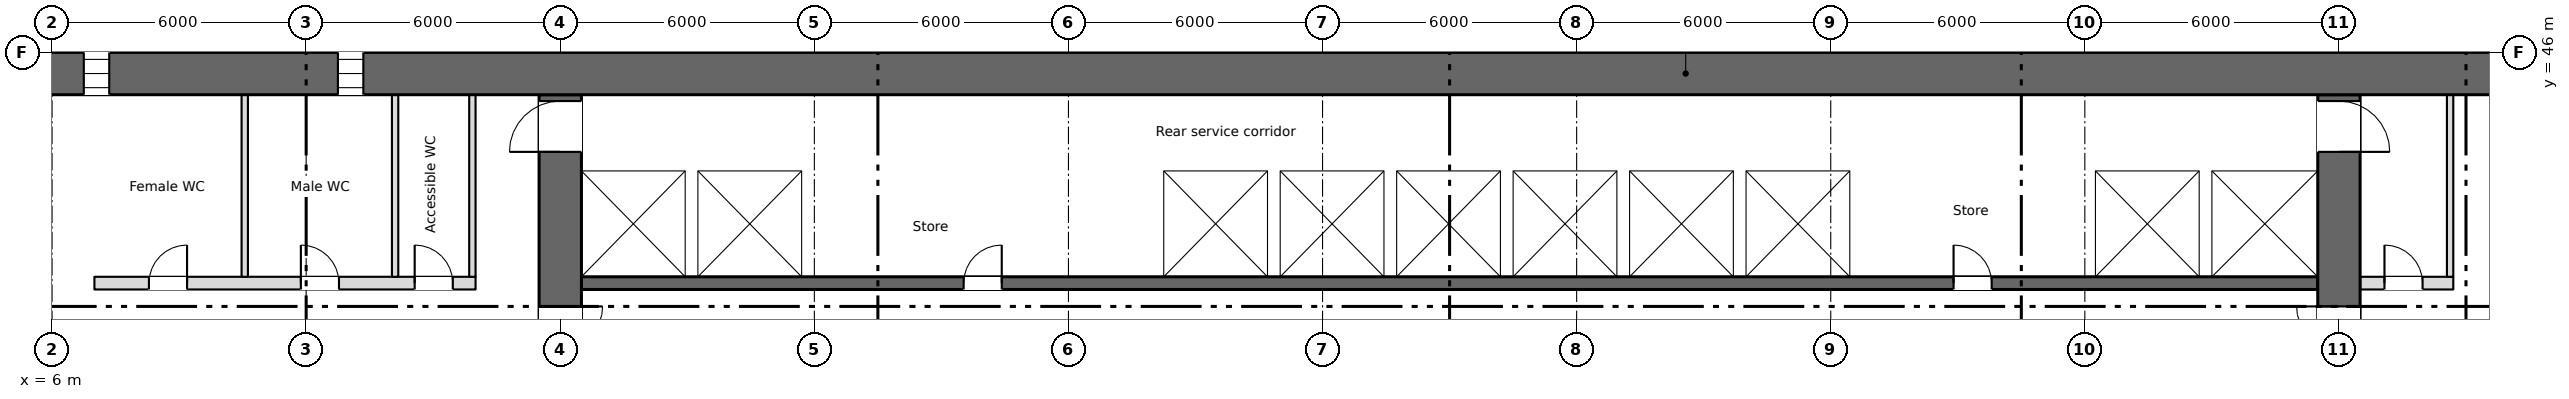
"""IFC4 building model, lengths in metres.
Left out: names, types, materials, properties, quantities, classifications, styles, units other than length and angle.
Written with IfcOpenShell. Run it as: python <this file> out.ifc"""

import sys

from ifc_helpers import new_model, si_unit, direction, frame, frame_2d, origin, place, context, subcontext, project, spatial, rectangle, extrude, element, fill, save


model = new_model("IFC4")
c1 = context("Model", 3, precision=1e-05, world=origin(), true_north=direction((0.0, 1.0)))
c2 = subcontext(c1, "Body", "Model", "MODEL_VIEW")
j1 = project(units=[si_unit("LENGTHUNIT", "METRE"), si_unit("PLANEANGLEUNIT", "RADIAN")], contexts=[c1])
p1 = place(None, origin())
s1 = spatial("IfcSite", under=j1, at=p1, CompositionType="ELEMENT")
p2 = place(p1, origin())
s2 = spatial("IfcBuilding", under=s1, at=p2, CompositionType="ELEMENT")
p3 = place(p2, frame((0.0, 0.0, 60.0)))
s3 = spatial("IfcBuildingStorey", under=s2, at=p3, CompositionType="ELEMENT", Elevation=60.0)
p4 = place(p3, frame((5.55, 45.5, 0.0), z_axis=(0.0, 0.0, 1.0), x_axis=(1.0, 0.0, 0.0)))
e1 = element("IfcWall", 1, at=p4, inside=s3, PredefinedType="SHEAR", context=c2, shape_type="SweptSolid", body=[
    extrude(rectangle(XDim=66.9, YDim=1.0, at=frame_2d((33.45, 0.0))), origin(), (0.0, 0.0, 1.0), 3.35),
])
p5 = place(p4, frame((1.2, 0.0, 0.6)))
e2 = element("IfcOpeningElement", 2, at=p5, cuts=e1, PredefinedType="OPENING", context=c2, shape_type="SweptSolid", body=[
    extrude(rectangle(XDim=0.6, YDim=2.4, at=frame_2d((0.3, 1.2))), frame((0.0, 0.51, 0.0), z_axis=(0.0, -1.0, 0.0), x_axis=(1.0, 0.0, 0.0)), (0.0, 0.0, 1.0), 1.02),
])
p6 = place(p4, frame((7.2, 0.0, 0.6)))
e3 = element("IfcOpeningElement", 3, at=p6, cuts=e1, PredefinedType="OPENING", context=c2, shape_type="SweptSolid", body=[
    extrude(rectangle(XDim=0.6, YDim=2.4, at=frame_2d((0.3, 1.2))), frame((0.0, 0.51, 0.0), z_axis=(0.0, -1.0, 0.0), x_axis=(1.0, 0.0, 0.0)), (0.0, 0.0, 1.0), 1.02),
])
p7 = place(p4, frame((61.2, 0.0, 0.6)))
e4 = element("IfcOpeningElement", 4, at=p7, cuts=e1, PredefinedType="OPENING", context=c2, shape_type="SweptSolid", body=[
    extrude(rectangle(XDim=0.6, YDim=2.4, at=frame_2d((0.3, 1.2))), frame((0.0, 0.51, 0.0), z_axis=(0.0, -1.0, 0.0), x_axis=(1.0, 0.0, 0.0)), (0.0, 0.0, 1.0), 1.02),
])
p8 = place(p3, frame((6.85, 28.4, 0.0), z_axis=(0.0, 0.0, 1.0), x_axis=(0.0, 1.0, 0.0)))
e5 = element("IfcWall", 5, at=p8, inside=s3, PredefinedType="SHEAR", context=c2, shape_type="SweptSolid", body=[
    extrude(rectangle(XDim=16.6, YDim=0.3, at=frame_2d((8.3, 0.0))), origin(), (0.0, 0.0, 1.0), 3.35),
])
p9 = place(p3, frame((18.0, 28.4, 0.0), z_axis=(0.0, 0.0, 1.0), x_axis=(0.0, 1.0, 0.0)))
e6 = element("IfcWall", 6, at=p9, inside=s3, PredefinedType="SHEAR", context=c2, shape_type="SweptSolid", body=[
    extrude(rectangle(XDim=16.6, YDim=1.0, at=frame_2d((8.3, 0.0))), origin(), (0.0, 0.0, 1.0), 3.35),
])
p10 = place(p9, frame((9.6, 0.0, 0.0)))
e7 = element("IfcOpeningElement", 7, at=p10, cuts=e6, PredefinedType="OPENING", context=c2, shape_type="SweptSolid", body=[
    extrude(rectangle(XDim=2.0, YDim=2.1, at=frame_2d((1.0, 1.05))), frame((0.0, 0.51, 0.0), z_axis=(0.0, -1.0, 0.0), x_axis=(1.0, 0.0, 0.0)), (0.0, 0.0, 1.0), 1.02),
])
p11 = place(p9, frame((15.25, 0.0, 0.0)))
e8 = element("IfcOpeningElement", 8, at=p11, cuts=e6, PredefinedType="OPENING", context=c2, shape_type="SweptSolid", body=[
    extrude(rectangle(XDim=1.2, YDim=2.1, at=frame_2d((0.6, 1.05))), frame((0.0, 0.51, 0.0), z_axis=(0.0, -1.0, 0.0), x_axis=(1.0, 0.0, 0.0)), (0.0, 0.0, 1.0), 1.02),
])
p12 = place(p3, frame((60.0, 28.4, 0.0), z_axis=(0.0, 0.0, 1.0), x_axis=(0.0, 1.0, 0.0)))
e9 = element("IfcWall", 9, at=p12, inside=s3, PredefinedType="SHEAR", context=c2, shape_type="SweptSolid", body=[
    extrude(rectangle(XDim=16.6, YDim=1.0, at=frame_2d((8.3, 0.0))), origin(), (0.0, 0.0, 1.0), 3.35),
])
p13 = place(p12, frame((9.6, 0.0, 0.0)))
e10 = element("IfcOpeningElement", 10, at=p13, cuts=e9, PredefinedType="OPENING", context=c2, shape_type="SweptSolid", body=[
    extrude(rectangle(XDim=2.0, YDim=2.1, at=frame_2d((1.0, 1.05))), frame((0.0, 0.51, 0.0), z_axis=(0.0, -1.0, 0.0), x_axis=(1.0, 0.0, 0.0)), (0.0, 0.0, 1.0), 1.02),
])
p14 = place(p12, frame((15.25, 0.0, 0.0)))
e11 = element("IfcOpeningElement", 11, at=p14, cuts=e9, PredefinedType="OPENING", context=c2, shape_type="SweptSolid", body=[
    extrude(rectangle(XDim=1.2, YDim=2.1, at=frame_2d((0.6, 1.05))), frame((0.0, 0.51, 0.0), z_axis=(0.0, -1.0, 0.0), x_axis=(1.0, 0.0, 0.0)), (0.0, 0.0, 1.0), 1.02),
])
p15 = place(p3, frame((18.5, 40.55, 0.0), z_axis=(0.0, 0.0, 1.0), x_axis=(1.0, 0.0, 0.0)))
e12 = element("IfcWall", 12, at=p15, inside=s3, PredefinedType="SHEAR", context=c2, shape_type="SweptSolid", body=[
    extrude(rectangle(XDim=41.0, YDim=0.3, at=frame_2d((20.5, 0.0))), origin(), (0.0, 0.0, 1.0), 3.35),
])
p16 = place(p15, frame((9.025, 0.0, 0.0)))
e13 = element("IfcOpeningElement", 13, at=p16, cuts=e12, PredefinedType="OPENING", context=c2, shape_type="SweptSolid", body=[
    extrude(rectangle(XDim=0.9, YDim=2.1, at=frame_2d((0.45, 1.05))), frame((0.0, 0.16, 0.0), z_axis=(0.0, -1.0, 0.0), x_axis=(1.0, 0.0, 0.0)), (0.0, 0.0, 1.0), 0.32),
])
p17 = place(p15, frame((32.4, 0.0, 0.0)))
e14 = element("IfcOpeningElement", 14, at=p17, cuts=e12, PredefinedType="OPENING", context=c2, shape_type="SweptSolid", body=[
    extrude(rectangle(XDim=0.9, YDim=2.1, at=frame_2d((0.45, 1.05))), frame((0.0, 0.16, 0.0), z_axis=(0.0, -1.0, 0.0), x_axis=(1.0, 0.0, 0.0)), (0.0, 0.0, 1.0), 0.32),
])
p18 = place(p15, frame((14.425, 0.0, 0.0)))
e15 = element("IfcOpeningElement", 15, at=p18, cuts=e12, PredefinedType="OPENING", context=c2, shape_type="SweptSolid", body=[
    extrude(rectangle(XDim=1.1, YDim=2.1, at=frame_2d((0.55, 1.05))), frame((0.0, 0.16, 0.0), z_axis=(0.0, -1.0, 0.0), x_axis=(1.0, 0.0, 0.0)), (0.0, 0.0, 1.0), 0.32),
])
p19 = place(p15, frame((17.175, 0.0, 0.0)))
e16 = element("IfcOpeningElement", 16, at=p19, cuts=e12, PredefinedType="OPENING", context=c2, shape_type="SweptSolid", body=[
    extrude(rectangle(XDim=1.1, YDim=2.1, at=frame_2d((0.55, 1.05))), frame((0.0, 0.16, 0.0), z_axis=(0.0, -1.0, 0.0), x_axis=(1.0, 0.0, 0.0)), (0.0, 0.0, 1.0), 0.32),
])
p20 = place(p15, frame((19.925, 0.0, 0.0)))
e17 = element("IfcOpeningElement", 17, at=p20, cuts=e12, PredefinedType="OPENING", context=c2, shape_type="SweptSolid", body=[
    extrude(rectangle(XDim=1.1, YDim=2.1, at=frame_2d((0.55, 1.05))), frame((0.0, 0.16, 0.0), z_axis=(0.0, -1.0, 0.0), x_axis=(1.0, 0.0, 0.0)), (0.0, 0.0, 1.0), 0.32),
])
p21 = place(p15, frame((22.675, 0.0, 0.0)))
e18 = element("IfcOpeningElement", 18, at=p21, cuts=e12, PredefinedType="OPENING", context=c2, shape_type="SweptSolid", body=[
    extrude(rectangle(XDim=1.1, YDim=2.1, at=frame_2d((0.55, 1.05))), frame((0.0, 0.16, 0.0), z_axis=(0.0, -1.0, 0.0), x_axis=(1.0, 0.0, 0.0)), (0.0, 0.0, 1.0), 0.32),
])
p22 = place(p15, frame((36.375, 0.0, 0.0)))
e19 = element("IfcOpeningElement", 19, at=p22, cuts=e12, PredefinedType="OPENING", context=c2, shape_type="SweptSolid", body=[
    extrude(rectangle(XDim=1.2, YDim=2.1, at=frame_2d((0.6, 1.05))), frame((0.0, 0.16, 0.0), z_axis=(0.0, -1.0, 0.0), x_axis=(1.0, 0.0, 0.0)), (0.0, 0.0, 1.0), 0.32),
])
p23 = place(p15, frame((39.15, 0.0, 0.0)))
e20 = element("IfcOpeningElement", 20, at=p23, cuts=e12, PredefinedType="OPENING", context=c2, shape_type="SweptSolid", body=[
    extrude(rectangle(XDim=1.2, YDim=2.1, at=frame_2d((0.6, 1.05))), frame((0.0, 0.16, 0.0), z_axis=(0.0, -1.0, 0.0), x_axis=(1.0, 0.0, 0.0)), (0.0, 0.0, 1.0), 0.32),
])
p24 = place(p3, frame((18.5, 43.35, 0.0), z_axis=(0.0, 0.0, 1.0), x_axis=(1.0, 0.0, 0.0)))
e21 = element("IfcWall", 21, at=p24, inside=s3, PredefinedType="SHEAR", context=c2, shape_type="SweptSolid", body=[
    extrude(rectangle(XDim=41.0, YDim=0.3, at=frame_2d((20.5, 0.0))), origin(), (0.0, 0.0, 1.0), 3.35),
])
p25 = place(p3, frame((7.0, 40.55, 0.0), z_axis=(0.0, 0.0, 1.0), x_axis=(1.0, 0.0, 0.0)))
e22 = element("IfcWall", 22, at=p25, inside=s3, PredefinedType="PARTITIONING", context=c2, shape_type="SweptSolid", body=[
    extrude(rectangle(XDim=9.0, YDim=0.3, at=frame_2d((4.5, 0.0))), origin(), (0.0, 0.0, 1.0), 3.35),
])
p26 = place(p25, frame((1.288, 0.0, 0.0)))
e23 = element("IfcOpeningElement", 23, at=p26, cuts=e22, PredefinedType="OPENING", context=c2, shape_type="SweptSolid", body=[
    extrude(rectangle(XDim=0.9, YDim=2.1, at=frame_2d((0.45, 1.05))), frame((0.0, 0.16, 0.0), z_axis=(0.0, -1.0, 0.0), x_axis=(1.0, 0.0, 0.0)), (0.0, 0.0, 1.0), 0.32),
])
p27 = place(p25, frame((4.875, 0.0, 0.0)))
e24 = element("IfcOpeningElement", 24, at=p27, cuts=e22, PredefinedType="OPENING", context=c2, shape_type="SweptSolid", body=[
    extrude(rectangle(XDim=0.9, YDim=2.1, at=frame_2d((0.45, 1.05))), frame((0.0, 0.16, 0.0), z_axis=(0.0, -1.0, 0.0), x_axis=(1.0, 0.0, 0.0)), (0.0, 0.0, 1.0), 0.32),
])
p28 = place(p25, frame((7.562, 0.0, 0.0)))
e25 = element("IfcOpeningElement", 25, at=p28, cuts=e22, PredefinedType="OPENING", context=c2, shape_type="SweptSolid", body=[
    extrude(rectangle(XDim=0.9, YDim=2.1, at=frame_2d((0.45, 1.05))), frame((0.0, 0.16, 0.0), z_axis=(0.0, -1.0, 0.0), x_axis=(1.0, 0.0, 0.0)), (0.0, 0.0, 1.0), 0.32),
])
p29 = place(p3, frame((60.5, 40.55, 0.0), z_axis=(0.0, 0.0, 1.0), x_axis=(1.0, 0.0, 0.0)))
e26 = element("IfcWall", 26, at=p29, inside=s3, PredefinedType="PARTITIONING", context=c2, shape_type="SweptSolid", body=[
    extrude(rectangle(XDim=2.2, YDim=0.3, at=frame_2d((1.1, 0.0))), origin(), (0.0, 0.0, 1.0), 3.35),
])
p30 = place(p29, frame((0.575, 0.0, 0.0)))
e27 = element("IfcOpeningElement", 27, at=p30, cuts=e26, PredefinedType="OPENING", context=c2, shape_type="SweptSolid", body=[
    extrude(rectangle(XDim=0.9, YDim=2.1, at=frame_2d((0.45, 1.05))), frame((0.0, 0.16, 0.0), z_axis=(0.0, -1.0, 0.0), x_axis=(1.0, 0.0, 0.0)), (0.0, 0.0, 1.0), 0.32),
])
for number, where, z_axis, x_axis in (
    (28, (21.1, 40.7, 0.0), (0.0, 0.0, 1.0), (0.0, 1.0, 0.0)),
    (29, (23.85, 40.7, 0.0), (0.0, 0.0, 1.0), (0.0, 1.0, 0.0)),
    (30, (32.1, 40.7, 0.0), (0.0, 0.0, 1.0), (0.0, 1.0, 0.0)),
    (31, (34.85, 40.7, 0.0), (0.0, 0.0, 1.0), (0.0, 1.0, 0.0)),
    (32, (37.6, 40.7, 0.0), (0.0, 0.0, 1.0), (0.0, 1.0, 0.0)),
    (33, (40.35, 40.7, 0.0), (0.0, 0.0, 1.0), (0.0, 1.0, 0.0)),
    (34, (43.1, 40.7, 0.0), (0.0, 0.0, 1.0), (0.0, 1.0, 0.0)),
    (35, (45.85, 40.7, 0.0), (0.0, 0.0, 1.0), (0.0, 1.0, 0.0)),
    (36, (48.6, 40.7, 0.0), (0.0, 0.0, 1.0), (0.0, 1.0, 0.0)),
    (37, (54.1, 40.7, 0.0), (0.0, 0.0, 1.0), (0.0, 1.0, 0.0)),
    (38, (56.85, 40.7, 0.0), (0.0, 0.0, 1.0), (0.0, 1.0, 0.0)),
):
    element("IfcWall", number, at=place(p3, frame(where, z_axis=z_axis, x_axis=x_axis)), inside=s3, PredefinedType="SHEAR", context=c2, shape_type="SweptSolid", body=[
        extrude(rectangle(XDim=2.5, YDim=0.3, at=frame_2d((1.25, 0.0))), origin(), (0.0, 0.0, 1.0), 3.35),
    ])
for number, where, z_axis, x_axis in (
    (39, (15.925, 40.7, 0.0), (0.0, 0.0, 1.0), (0.0, 1.0, 0.0)),
    (40, (62.625, 40.7, 0.0), (0.0, 0.0, 1.0), (0.0, 1.0, 0.0)),
    (41, (10.55, 40.7, 0.0), (0.0, 0.0, 1.0), (0.0, 1.0, 0.0)),
    (42, (14.1, 40.7, 0.0), (0.0, 0.0, 1.0), (0.0, 1.0, 0.0)),
):
    element("IfcWall", number, at=place(p3, frame(where, z_axis=z_axis, x_axis=x_axis)), inside=s3, PredefinedType="PARTITIONING", context=c2, shape_type="SweptSolid", body=[
        extrude(rectangle(XDim=4.3, YDim=0.15, at=frame_2d((2.15, 0.0))), origin(), (0.0, 0.0, 1.0), 3.35),
    ])
p31 = place(p5, origin())
e43 = element("IfcWindow", 43, at=p31, inside=s3, PartitioningType="SINGLE_PANEL", PredefinedType="WINDOW", context=c2, shape_type="SweptSolid", body=[
    extrude(rectangle(XDim=0.6, YDim=2.4, at=frame_2d((0.3, 1.2))), frame((0.0, 0.03, 0.0), z_axis=(0.0, -1.0, 0.0), x_axis=(1.0, 0.0, 0.0)), (0.0, 0.0, 1.0), 0.06),
])
fill(e2, e43)
p32 = place(p6, origin())
e44 = element("IfcWindow", 44, at=p32, inside=s3, PartitioningType="SINGLE_PANEL", PredefinedType="WINDOW", context=c2, shape_type="SweptSolid", body=[
    extrude(rectangle(XDim=0.6, YDim=2.4, at=frame_2d((0.3, 1.2))), frame((0.0, 0.03, 0.0), z_axis=(0.0, -1.0, 0.0), x_axis=(1.0, 0.0, 0.0)), (0.0, 0.0, 1.0), 0.06),
])
fill(e3, e44)
p33 = place(p26, origin())
e45 = element("IfcDoor", 45, at=p33, inside=s3, OperationType="SINGLE_SWING_RIGHT", PredefinedType="DOOR", context=c2, shape_type="SweptSolid", body=[
    extrude(rectangle(XDim=0.9, YDim=2.1, at=frame_2d((0.45, 1.05))), frame((0.0, 0.025, 0.0), z_axis=(0.0, -1.0, 0.0), x_axis=(1.0, 0.0, 0.0)), (0.0, 0.0, 1.0), 0.05),
])
fill(e23, e45)
p34 = place(p27, origin())
e46 = element("IfcDoor", 46, at=p34, inside=s3, OperationType="SINGLE_SWING_LEFT", PredefinedType="DOOR", context=c2, shape_type="SweptSolid", body=[
    extrude(rectangle(XDim=0.9, YDim=2.1, at=frame_2d((0.45, 1.05))), frame((0.0, 0.025, 0.0), z_axis=(0.0, -1.0, 0.0), x_axis=(1.0, 0.0, 0.0)), (0.0, 0.0, 1.0), 0.05),
])
fill(e24, e46)
p35 = place(p28, origin())
e47 = element("IfcDoor", 47, at=p35, inside=s3, OperationType="SINGLE_SWING_LEFT", PredefinedType="DOOR", context=c2, shape_type="SweptSolid", body=[
    extrude(rectangle(XDim=0.9, YDim=2.1, at=frame_2d((0.45, 1.05))), frame((0.0, 0.025, 0.0), z_axis=(0.0, -1.0, 0.0), x_axis=(1.0, 0.0, 0.0)), (0.0, 0.0, 1.0), 0.05),
])
fill(e25, e47)
p36 = place(p30, origin())
e48 = element("IfcDoor", 48, at=p36, inside=s3, OperationType="SINGLE_SWING_LEFT", PredefinedType="DOOR", context=c2, shape_type="SweptSolid", body=[
    extrude(rectangle(XDim=0.9, YDim=2.1, at=frame_2d((0.45, 1.05))), frame((0.0, 0.025, 0.0), z_axis=(0.0, -1.0, 0.0), x_axis=(1.0, 0.0, 0.0)), (0.0, 0.0, 1.0), 0.05),
])
fill(e27, e48)
p37 = place(p16, origin())
e49 = element("IfcDoor", 49, at=p37, inside=s3, OperationType="SINGLE_SWING_RIGHT", PredefinedType="DOOR", context=c2, shape_type="SweptSolid", body=[
    extrude(rectangle(XDim=0.9, YDim=2.1, at=frame_2d((0.45, 1.05))), frame((0.0, 0.025, 0.0), z_axis=(0.0, -1.0, 0.0), x_axis=(1.0, 0.0, 0.0)), (0.0, 0.0, 1.0), 0.05),
])
fill(e13, e49)
p38 = place(p17, origin())
e50 = element("IfcDoor", 50, at=p38, inside=s3, OperationType="SINGLE_SWING_LEFT", PredefinedType="DOOR", context=c2, shape_type="SweptSolid", body=[
    extrude(rectangle(XDim=0.9, YDim=2.1, at=frame_2d((0.45, 1.05))), frame((0.0, 0.025, 0.0), z_axis=(0.0, -1.0, 0.0), x_axis=(1.0, 0.0, 0.0)), (0.0, 0.0, 1.0), 0.05),
])
fill(e14, e50)
p39 = place(p18, origin())
e51 = element("IfcDoor", 51, at=p39, inside=s3, OperationType="SLIDING_TO_LEFT", PredefinedType="DOOR", context=c2, shape_type="SweptSolid", body=[
    extrude(rectangle(XDim=1.1, YDim=2.1, at=frame_2d((0.55, 1.05))), frame((0.0, 0.025, 0.0), z_axis=(0.0, -1.0, 0.0), x_axis=(1.0, 0.0, 0.0)), (0.0, 0.0, 1.0), 0.05),
])
fill(e15, e51)
p40 = place(p19, origin())
e52 = element("IfcDoor", 52, at=p40, inside=s3, OperationType="SLIDING_TO_LEFT", PredefinedType="DOOR", context=c2, shape_type="SweptSolid", body=[
    extrude(rectangle(XDim=1.1, YDim=2.1, at=frame_2d((0.55, 1.05))), frame((0.0, 0.025, 0.0), z_axis=(0.0, -1.0, 0.0), x_axis=(1.0, 0.0, 0.0)), (0.0, 0.0, 1.0), 0.05),
])
fill(e16, e52)
p41 = place(p20, origin())
e53 = element("IfcDoor", 53, at=p41, inside=s3, OperationType="SLIDING_TO_LEFT", PredefinedType="DOOR", context=c2, shape_type="SweptSolid", body=[
    extrude(rectangle(XDim=1.1, YDim=2.1, at=frame_2d((0.55, 1.05))), frame((0.0, 0.025, 0.0), z_axis=(0.0, -1.0, 0.0), x_axis=(1.0, 0.0, 0.0)), (0.0, 0.0, 1.0), 0.05),
])
fill(e17, e53)
p42 = place(p21, origin())
e54 = element("IfcDoor", 54, at=p42, inside=s3, OperationType="SLIDING_TO_LEFT", PredefinedType="DOOR", context=c2, shape_type="SweptSolid", body=[
    extrude(rectangle(XDim=1.1, YDim=2.1, at=frame_2d((0.55, 1.05))), frame((0.0, 0.025, 0.0), z_axis=(0.0, -1.0, 0.0), x_axis=(1.0, 0.0, 0.0)), (0.0, 0.0, 1.0), 0.05),
])
fill(e18, e54)
p43 = place(p22, origin())
e55 = element("IfcDoor", 55, at=p43, inside=s3, OperationType="SLIDING_TO_LEFT", PredefinedType="DOOR", context=c2, shape_type="SweptSolid", body=[
    extrude(rectangle(XDim=1.2, YDim=2.1, at=frame_2d((0.6, 1.05))), frame((0.0, 0.025, 0.0), z_axis=(0.0, -1.0, 0.0), x_axis=(1.0, 0.0, 0.0)), (0.0, 0.0, 1.0), 0.05),
])
fill(e19, e55)
p44 = place(p23, origin())
e56 = element("IfcDoor", 56, at=p44, inside=s3, OperationType="SLIDING_TO_LEFT", PredefinedType="DOOR", context=c2, shape_type="SweptSolid", body=[
    extrude(rectangle(XDim=1.2, YDim=2.1, at=frame_2d((0.6, 1.05))), frame((0.0, 0.025, 0.0), z_axis=(0.0, -1.0, 0.0), x_axis=(1.0, 0.0, 0.0)), (0.0, 0.0, 1.0), 0.05),
])
fill(e20, e56)
p45 = place(p10, origin())
e57 = element("IfcDoor", 57, at=p45, inside=s3, OperationType="DOUBLE_DOOR_SINGLE_SWING", PredefinedType="DOOR", context=c2, shape_type="SweptSolid", body=[
    extrude(rectangle(XDim=2.0, YDim=2.1, at=frame_2d((1.0, 1.05))), frame((0.0, 0.025, 0.0), z_axis=(0.0, -1.0, 0.0), x_axis=(1.0, 0.0, 0.0)), (0.0, 0.0, 1.0), 0.05),
])
fill(e7, e57)
p46 = place(p13, origin())
e58 = element("IfcDoor", 58, at=p46, inside=s3, OperationType="DOUBLE_DOOR_SINGLE_SWING", PredefinedType="DOOR", context=c2, shape_type="SweptSolid", body=[
    extrude(rectangle(XDim=2.0, YDim=2.1, at=frame_2d((1.0, 1.05))), frame((0.0, 0.025, 0.0), z_axis=(0.0, -1.0, 0.0), x_axis=(1.0, 0.0, 0.0)), (0.0, 0.0, 1.0), 0.05),
])
fill(e10, e58)
p47 = place(p11, origin())
e59 = element("IfcDoor", 59, at=p47, inside=s3, OperationType="SINGLE_SWING_LEFT", PredefinedType="DOOR", context=c2, shape_type="SweptSolid", body=[
    extrude(rectangle(XDim=1.2, YDim=2.1, at=frame_2d((0.6, 1.05))), frame((0.0, 0.025, 0.0), z_axis=(0.0, -1.0, 0.0), x_axis=(1.0, 0.0, 0.0)), (0.0, 0.0, 1.0), 0.05),
])
fill(e8, e59)
p48 = place(p14, origin())
e60 = element("IfcDoor", 60, at=p48, inside=s3, OperationType="SINGLE_SWING_LEFT", PredefinedType="DOOR", context=c2, shape_type="SweptSolid", body=[
    extrude(rectangle(XDim=1.2, YDim=2.1, at=frame_2d((0.6, 1.05))), frame((0.0, 0.025, 0.0), z_axis=(0.0, -1.0, 0.0), x_axis=(1.0, 0.0, 0.0)), (0.0, 0.0, 1.0), 0.05),
])
fill(e11, e60)
save(model, sys.argv[1])
